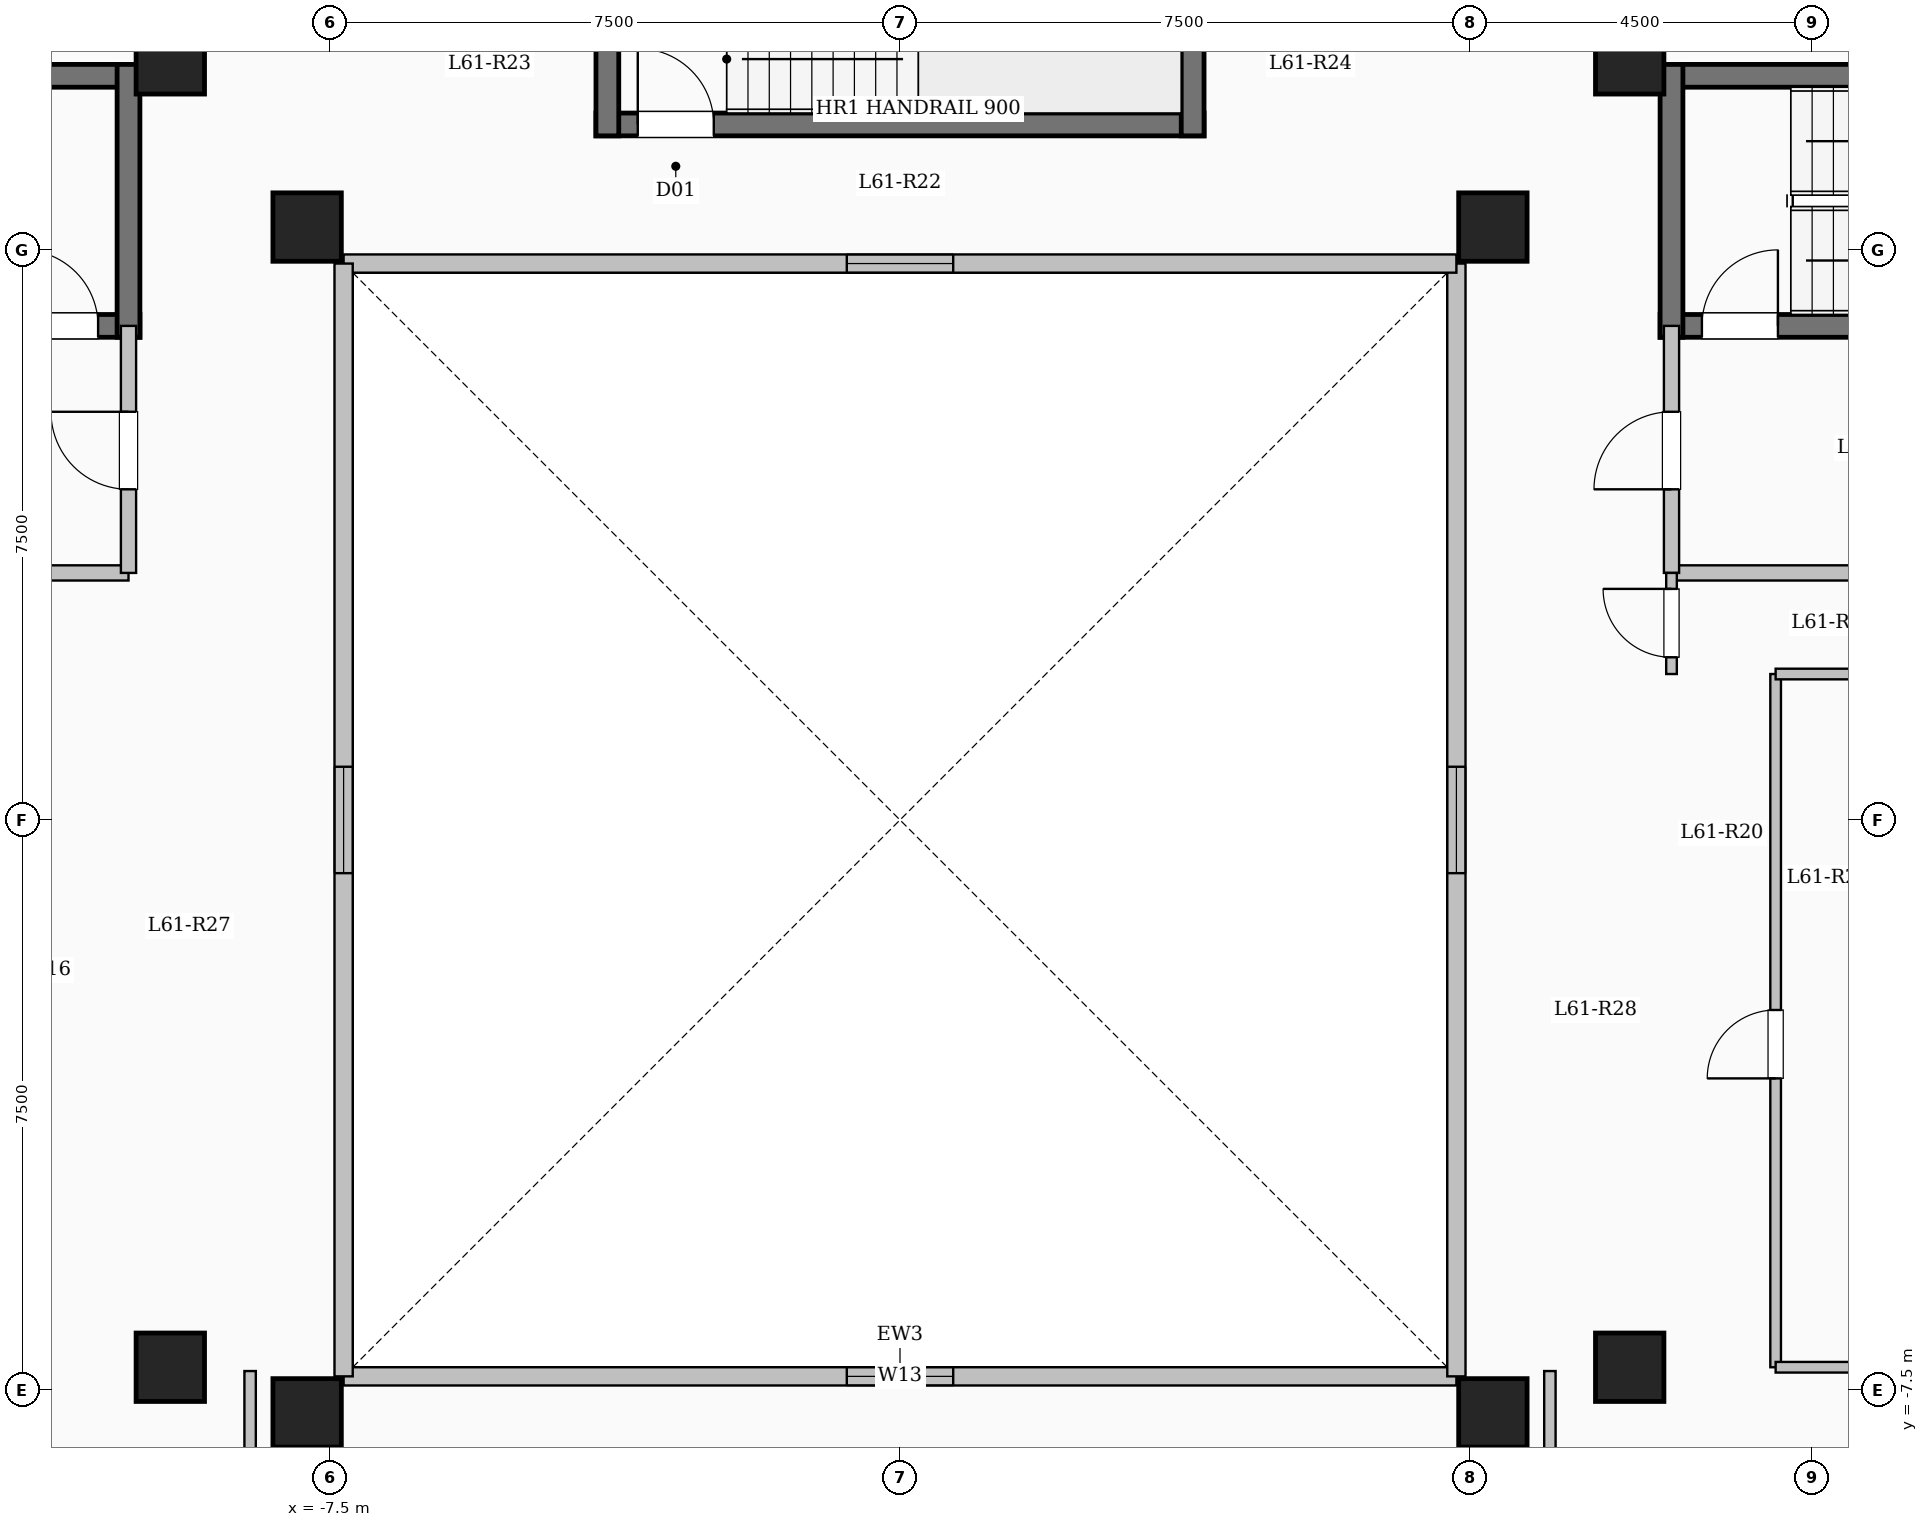
"""IFC4 building model, lengths in metres.
Left out: names, types, materials, properties, quantities, classifications, styles, units other than length and angle.
Written with IfcOpenShell. Run it as: python <this file> out.ifc"""

import sys

from ifc_helpers import new_model, si_unit, direction, frame, frame_2d, origin, origin_2d, place, context, subcontext, project, spatial, rectangle, extrude, element, fill, save


model = new_model("IFC4")
c1 = context("Model", 3, precision=1e-05, world=origin(), true_north=direction((0.0, 1.0)))
c2 = subcontext(c1, "Body", "Model", "MODEL_VIEW")
j1 = project(units=[si_unit("LENGTHUNIT", "METRE"), si_unit("PLANEANGLEUNIT", "RADIAN")], contexts=[c1])
p1 = place(None, origin())
s1 = spatial("IfcSite", under=j1, at=p1, CompositionType="ELEMENT")
p2 = place(p1, origin())
s2 = spatial("IfcBuilding", under=s1, at=p2, CompositionType="ELEMENT")
p3 = place(p2, frame((0.0, 0.0, 223.75)))
s3 = spatial("IfcBuildingStorey", under=s2, at=p3, CompositionType="ELEMENT", Elevation=223.75)
for number, where, z_axis, x_axis in (
    (1, (-7.8, -7.8, 0.0), (0.0, 0.0, 1.0), (1.0, 0.0, 0.0)),
    (2, (7.8, -7.8, 0.0), (0.0, 0.0, 1.0), (1.0, 0.0, 0.0)),
    (3, (-7.8, 7.8, 0.0), (0.0, 0.0, 1.0), (1.0, 0.0, 0.0)),
    (4, (7.8, 7.8, 0.0), (0.0, 0.0, 1.0), (1.0, 0.0, 0.0)),
    (5, (-9.6, -7.2, 0.0), (0.0, 0.0, 1.0), (1.0, 0.0, 0.0)),
    (6, (-9.6, 10.0, 0.0), (0.0, 0.0, 1.0), (1.0, 0.0, 0.0)),
    (7, (9.6, -7.2, 0.0), (0.0, 0.0, 1.0), (1.0, 0.0, 0.0)),
    (8, (9.6, 10.0, 0.0), (0.0, 0.0, 1.0), (1.0, 0.0, 0.0)),
):
    element("IfcColumn", number, at=place(p3, frame(where, z_axis=z_axis, x_axis=x_axis)), inside=s3, PredefinedType="COLUMN", context=c2, shape_type="SweptSolid", body=[
        extrude(rectangle(XDim=0.9, YDim=0.9, at=origin_2d()), origin(), (0.0, 0.0, 1.0), 3.35),
    ])
p4 = place(p3, frame((-7.32, -7.32, 0.0), z_axis=(0.0, 0.0, 1.0), x_axis=(1.0, 0.0, 0.0)))
e9 = element("IfcWall", 9, at=p4, inside=s3, PredefinedType="SOLIDWALL", context=c2, shape_type="SweptSolid", body=[
    extrude(rectangle(XDim=14.64, YDim=0.24, at=frame_2d((7.32, 0.0))), origin(), (0.0, 0.0, 1.0), 3.05),
])
p5 = place(p4, frame((6.62, 0.0, 0.95)))
e10 = element("IfcOpeningElement", 10, at=p5, cuts=e9, PredefinedType="OPENING", context=c2, shape_type="SweptSolid", body=[
    extrude(rectangle(XDim=1.4, YDim=1.5, at=frame_2d((0.7, 0.75))), frame((0.0, 0.13, 0.0), z_axis=(0.0, -1.0, 0.0), x_axis=(1.0, 0.0, 0.0)), (0.0, 0.0, 1.0), 0.26),
])
p6 = place(p3, frame((7.32, -7.32, 0.0), z_axis=(0.0, 0.0, 1.0), x_axis=(0.0, 1.0, 0.0)))
e11 = element("IfcWall", 11, at=p6, inside=s3, PredefinedType="SOLIDWALL", context=c2, shape_type="SweptSolid", body=[
    extrude(rectangle(XDim=14.64, YDim=0.24, at=frame_2d((7.32, 0.0))), origin(), (0.0, 0.0, 1.0), 3.05),
])
p7 = place(p6, frame((6.62, 0.0, 0.95)))
e12 = element("IfcOpeningElement", 12, at=p7, cuts=e11, PredefinedType="OPENING", context=c2, shape_type="SweptSolid", body=[
    extrude(rectangle(XDim=1.4, YDim=1.5, at=frame_2d((0.7, 0.75))), frame((0.0, 0.13, 0.0), z_axis=(0.0, -1.0, 0.0), x_axis=(1.0, 0.0, 0.0)), (0.0, 0.0, 1.0), 0.26),
])
p8 = place(p3, frame((7.32, 7.32, 0.0), z_axis=(0.0, 0.0, 1.0), x_axis=(-1.0, 0.0, 0.0)))
e13 = element("IfcWall", 13, at=p8, inside=s3, PredefinedType="SOLIDWALL", context=c2, shape_type="SweptSolid", body=[
    extrude(rectangle(XDim=14.64, YDim=0.24, at=frame_2d((7.32, 0.0))), origin(), (0.0, 0.0, 1.0), 3.05),
])
p9 = place(p8, frame((6.62, 0.0, 0.95)))
e14 = element("IfcOpeningElement", 14, at=p9, cuts=e13, PredefinedType="OPENING", context=c2, shape_type="SweptSolid", body=[
    extrude(rectangle(XDim=1.4, YDim=1.5, at=frame_2d((0.7, 0.75))), frame((0.0, 0.13, 0.0), z_axis=(0.0, -1.0, 0.0), x_axis=(1.0, 0.0, 0.0)), (0.0, 0.0, 1.0), 0.26),
])
p10 = place(p3, frame((-7.32, 7.32, 0.0), z_axis=(0.0, 0.0, 1.0), x_axis=(0.0, -1.0, 0.0)))
e15 = element("IfcWall", 15, at=p10, inside=s3, PredefinedType="SOLIDWALL", context=c2, shape_type="SweptSolid", body=[
    extrude(rectangle(XDim=14.64, YDim=0.24, at=frame_2d((7.32, 0.0))), origin(), (0.0, 0.0, 1.0), 3.05),
])
p11 = place(p10, frame((6.62, 0.0, 0.95)))
e16 = element("IfcOpeningElement", 16, at=p11, cuts=e15, PredefinedType="OPENING", context=c2, shape_type="SweptSolid", body=[
    extrude(rectangle(XDim=1.4, YDim=1.5, at=frame_2d((0.7, 0.75))), frame((0.0, 0.13, 0.0), z_axis=(0.0, -1.0, 0.0), x_axis=(1.0, 0.0, 0.0)), (0.0, 0.0, 1.0), 0.26),
])
p12 = place(p3, frame((-18.0, 9.79, 0.0), z_axis=(0.0, 0.0, 1.0), x_axis=(1.0, 0.0, 0.0)))
e17 = element("IfcWall", 17, at=p12, inside=s3, PredefinedType="SHEAR", context=c2, shape_type="SweptSolid", body=[
    extrude(rectangle(XDim=8.0, YDim=0.3, at=frame_2d((4.0, 0.0))), origin(), (0.0, 0.0, 1.0), 3.35),
])
p13 = place(p3, frame((-18.0, 6.5, 0.0), z_axis=(0.0, 0.0, 1.0), x_axis=(1.0, 0.0, 0.0)))
e18 = element("IfcWall", 18, at=p13, inside=s3, PredefinedType="SHEAR", context=c2, shape_type="SweptSolid", body=[
    extrude(rectangle(XDim=8.0, YDim=0.3, at=frame_2d((4.0, 0.0))), origin(), (0.0, 0.0, 1.0), 3.35),
])
p14 = place(p13, frame((6.45, 0.0, 0.0)))
e19 = element("IfcOpeningElement", 19, at=p14, cuts=e18, PredefinedType="OPENING", context=c2, shape_type="SweptSolid", body=[
    extrude(rectangle(XDim=1.0, YDim=2.15, at=frame_2d((0.5, 1.075))), frame((0.0, 0.16, 0.0), z_axis=(0.0, -1.0, 0.0), x_axis=(1.0, 0.0, 0.0)), (0.0, 0.0, 1.0), 0.32),
])
p15 = place(p3, frame((-10.15, 6.35, 0.0), z_axis=(0.0, 0.0, 1.0), x_axis=(0.0, 1.0, 0.0)))
e20 = element("IfcWall", 20, at=p15, inside=s3, PredefinedType="SHEAR", context=c2, shape_type="SweptSolid", body=[
    extrude(rectangle(XDim=3.59, YDim=0.3, at=frame_2d((1.795, 0.0))), origin(), (0.0, 0.0, 1.0), 3.35),
])
p16 = place(p3, frame((10.0, 9.79, 0.0), z_axis=(0.0, 0.0, 1.0), x_axis=(1.0, 0.0, 0.0)))
e21 = element("IfcWall", 21, at=p16, inside=s3, PredefinedType="SHEAR", context=c2, shape_type="SweptSolid", body=[
    extrude(rectangle(XDim=8.0, YDim=0.3, at=frame_2d((4.0, 0.0))), origin(), (0.0, 0.0, 1.0), 3.35),
])
p17 = place(p3, frame((10.0, 6.5, 0.0), z_axis=(0.0, 0.0, 1.0), x_axis=(1.0, 0.0, 0.0)))
e22 = element("IfcWall", 22, at=p17, inside=s3, PredefinedType="SHEAR", context=c2, shape_type="SweptSolid", body=[
    extrude(rectangle(XDim=8.0, YDim=0.3, at=frame_2d((4.0, 0.0))), origin(), (0.0, 0.0, 1.0), 3.35),
])
p18 = place(p17, frame((0.55, 0.0, 0.0)))
e23 = element("IfcOpeningElement", 23, at=p18, cuts=e22, PredefinedType="OPENING", context=c2, shape_type="SweptSolid", body=[
    extrude(rectangle(XDim=1.0, YDim=2.15, at=frame_2d((0.5, 1.075))), frame((0.0, 0.16, 0.0), z_axis=(0.0, -1.0, 0.0), x_axis=(1.0, 0.0, 0.0)), (0.0, 0.0, 1.0), 0.32),
])
p19 = place(p3, frame((10.15, 6.35, 0.0), z_axis=(0.0, 0.0, 1.0), x_axis=(0.0, 1.0, 0.0)))
e24 = element("IfcWall", 24, at=p19, inside=s3, PredefinedType="SHEAR", context=c2, shape_type="SweptSolid", body=[
    extrude(rectangle(XDim=3.59, YDim=0.3, at=frame_2d((1.795, 0.0))), origin(), (0.0, 0.0, 1.0), 3.35),
])
p20 = place(p3, frame((-4.0, 9.15, 0.0), z_axis=(0.0, 0.0, 1.0), x_axis=(1.0, 0.0, 0.0)))
e25 = element("IfcWall", 25, at=p20, inside=s3, PredefinedType="SHEAR", context=c2, shape_type="SweptSolid", body=[
    extrude(rectangle(XDim=8.0, YDim=0.3, at=frame_2d((4.0, 0.0))), origin(), (0.0, 0.0, 1.0), 3.35),
])
p21 = place(p20, frame((0.55, 0.0, 0.0)))
e26 = element("IfcOpeningElement", 26, at=p21, cuts=e25, PredefinedType="OPENING", context=c2, shape_type="SweptSolid", body=[
    extrude(rectangle(XDim=1.0, YDim=2.15, at=frame_2d((0.5, 1.075))), frame((0.0, 0.16, 0.0), z_axis=(0.0, -1.0, 0.0), x_axis=(1.0, 0.0, 0.0)), (0.0, 0.0, 1.0), 0.32),
])
for number, where, z_axis, x_axis in (
    (27, (-3.85, 9.0, 0.0), (0.0, 0.0, 1.0), (0.0, 1.0, 0.0)),
    (28, (3.85, 9.0, 0.0), (0.0, 0.0, 1.0), (0.0, 1.0, 0.0)),
):
    element("IfcWall", number, at=place(p3, frame(where, z_axis=z_axis, x_axis=x_axis)), inside=s3, PredefinedType="SHEAR", context=c2, shape_type="SweptSolid", body=[
        extrude(rectangle(XDim=3.59, YDim=0.3, at=frame_2d((1.795, 0.0))), origin(), (0.0, 0.0, 1.0), 3.35),
    ])
p22 = place(p3, frame((-15.55, 3.25, 0.0), z_axis=(0.0, 0.0, 1.0), x_axis=(1.0, 0.0, 0.0)))
e29 = element("IfcWall", 29, at=p22, inside=s3, PredefinedType="SOLIDWALL", context=c2, shape_type="SweptSolid", body=[
    extrude(rectangle(XDim=5.4, YDim=0.2, at=frame_2d((2.7, 0.0))), origin(), (0.0, 0.0, 1.0), 3.05),
])
p23 = place(p3, frame((-10.15, 3.25, 0.0), z_axis=(0.0, 0.0, 1.0), x_axis=(0.0, 1.0, 0.0)))
e30 = element("IfcWall", 30, at=p23, inside=s3, PredefinedType="SOLIDWALL", context=c2, shape_type="SweptSolid", body=[
    extrude(rectangle(XDim=3.25, YDim=0.2, at=frame_2d((1.625, 0.0))), origin(), (0.0, 0.0, 1.0), 3.05),
])
p24 = place(p23, frame((1.1, 0.0, 0.0)))
e31 = element("IfcOpeningElement", 31, at=p24, cuts=e30, PredefinedType="OPENING", context=c2, shape_type="SweptSolid", body=[
    extrude(rectangle(XDim=1.02, YDim=2.15, at=frame_2d((0.51, 1.075))), frame((0.0, 0.11, 0.0), z_axis=(0.0, -1.0, 0.0), x_axis=(1.0, 0.0, 0.0)), (0.0, 0.0, 1.0), 0.22),
])
p25 = place(p3, frame((10.15, 3.25, 0.0), z_axis=(0.0, 0.0, 1.0), x_axis=(1.0, 0.0, 0.0)))
e32 = element("IfcWall", 32, at=p25, inside=s3, PredefinedType="SOLIDWALL", context=c2, shape_type="SweptSolid", body=[
    extrude(rectangle(XDim=5.4, YDim=0.2, at=frame_2d((2.7, 0.0))), origin(), (0.0, 0.0, 1.0), 3.05),
])
p26 = place(p3, frame((10.15, 3.25, 0.0), z_axis=(0.0, 0.0, 1.0), x_axis=(0.0, 1.0, 0.0)))
e33 = element("IfcWall", 33, at=p26, inside=s3, PredefinedType="SOLIDWALL", context=c2, shape_type="SweptSolid", body=[
    extrude(rectangle(XDim=3.25, YDim=0.2, at=frame_2d((1.625, 0.0))), origin(), (0.0, 0.0, 1.0), 3.05),
])
p27 = place(p26, frame((1.1, 0.0, 0.0)))
e34 = element("IfcOpeningElement", 34, at=p27, cuts=e33, PredefinedType="OPENING", context=c2, shape_type="SweptSolid", body=[
    extrude(rectangle(XDim=1.02, YDim=2.15, at=frame_2d((0.51, 1.075))), frame((0.0, 0.11, 0.0), z_axis=(0.0, -1.0, 0.0), x_axis=(1.0, 0.0, 0.0)), (0.0, 0.0, 1.0), 0.22),
])
p28 = place(p3, frame((10.15, 1.92, 0.0), z_axis=(0.0, 0.0, 1.0), x_axis=(0.0, 1.0, 0.0)))
e35 = element("IfcWall", 35, at=p28, inside=s3, PredefinedType="PARTITIONING", context=c2, shape_type="SweptSolid", body=[
    extrude(rectangle(XDim=1.33, YDim=0.14, at=frame_2d((0.665, 0.0))), origin(), (0.0, 0.0, 1.0), 3.05),
])
p29 = place(p28, frame((0.22, 0.0, 0.0)))
e36 = element("IfcOpeningElement", 36, at=p29, cuts=e35, PredefinedType="OPENING", context=c2, shape_type="SweptSolid", body=[
    extrude(rectangle(XDim=0.9, YDim=2.08, at=frame_2d((0.45, 1.04))), frame((0.0, 0.08, 0.0), z_axis=(0.0, -1.0, 0.0), x_axis=(1.0, 0.0, 0.0)), (0.0, 0.0, 1.0), 0.16),
])
p30 = place(p3, frame((11.52, -7.2, 0.0), z_axis=(0.0, 0.0, 1.0), x_axis=(0.0, 1.0, 0.0)))
e37 = element("IfcWall", 37, at=p30, inside=s3, PredefinedType="PARTITIONING", context=c2, shape_type="SweptSolid", body=[
    extrude(rectangle(XDim=9.12, YDim=0.14, at=frame_2d((4.56, 0.0))), origin(), (0.0, 0.0, 1.0), 3.05),
])
p31 = place(p30, frame((3.8, 0.0, 0.0)))
e38 = element("IfcOpeningElement", 38, at=p31, cuts=e37, PredefinedType="OPENING", context=c2, shape_type="SweptSolid", body=[
    extrude(rectangle(XDim=0.9, YDim=2.08, at=frame_2d((0.45, 1.04))), frame((0.0, 0.08, 0.0), z_axis=(0.0, -1.0, 0.0), x_axis=(1.0, 0.0, 0.0)), (0.0, 0.0, 1.0), 0.16),
])
p32 = place(p3, frame((11.52, 1.92, 0.0), z_axis=(0.0, 0.0, 1.0), x_axis=(1.0, 0.0, 0.0)))
e39 = element("IfcWall", 39, at=p32, inside=s3, PredefinedType="PARTITIONING", context=c2, shape_type="SweptSolid", body=[
    extrude(rectangle(XDim=1.33, YDim=0.14, at=frame_2d((0.665, 0.0))), origin(), (0.0, 0.0, 1.0), 3.05),
])
p33 = place(p3, frame((11.52, -7.2, 0.0), z_axis=(0.0, 0.0, 1.0), x_axis=(1.0, 0.0, 0.0)))
e40 = element("IfcWall", 40, at=p33, inside=s3, PredefinedType="PARTITIONING", context=c2, shape_type="SweptSolid", body=[
    extrude(rectangle(XDim=1.33, YDim=0.14, at=frame_2d((0.665, 0.0))), origin(), (0.0, 0.0, 1.0), 2.22),
])
for number, where, z_axis, x_axis in (
    (41, (-8.55, -9.4, 0.0), (0.0, 0.0, 1.0), (0.0, 1.0, 0.0)),
    (42, (8.55, -9.4, 0.0), (0.0, 0.0, 1.0), (0.0, 1.0, 0.0)),
):
    element("IfcWall", number, at=place(p3, frame(where, z_axis=z_axis, x_axis=x_axis)), inside=s3, PredefinedType="PARTITIONING", context=c2, shape_type="SweptSolid", body=[
        extrude(rectangle(XDim=2.15, YDim=0.15, at=frame_2d((1.075, 0.0))), origin(), (0.0, 0.0, 1.0), 3.05),
    ])
p34 = place(p5, origin())
e43 = element("IfcWindow", 43, at=p34, inside=s3, PartitioningType="SINGLE_PANEL", PredefinedType="WINDOW", context=c2, shape_type="SweptSolid", body=[
    extrude(rectangle(XDim=1.4, YDim=1.5, at=frame_2d((0.7, 0.75))), frame((0.0, 0.03, 0.0), z_axis=(0.0, -1.0, 0.0), x_axis=(1.0, 0.0, 0.0)), (0.0, 0.0, 1.0), 0.06),
])
fill(e10, e43)
p35 = place(p7, origin())
e44 = element("IfcWindow", 44, at=p35, inside=s3, PartitioningType="SINGLE_PANEL", PredefinedType="WINDOW", context=c2, shape_type="SweptSolid", body=[
    extrude(rectangle(XDim=1.4, YDim=1.5, at=frame_2d((0.7, 0.75))), frame((0.0, 0.03, 0.0), z_axis=(0.0, -1.0, 0.0), x_axis=(1.0, 0.0, 0.0)), (0.0, 0.0, 1.0), 0.06),
])
fill(e12, e44)
p36 = place(p9, origin())
e45 = element("IfcWindow", 45, at=p36, inside=s3, PartitioningType="SINGLE_PANEL", PredefinedType="WINDOW", context=c2, shape_type="SweptSolid", body=[
    extrude(rectangle(XDim=1.4, YDim=1.5, at=frame_2d((0.7, 0.75))), frame((0.0, 0.03, 0.0), z_axis=(0.0, -1.0, 0.0), x_axis=(1.0, 0.0, 0.0)), (0.0, 0.0, 1.0), 0.06),
])
fill(e14, e45)
p37 = place(p11, origin())
e46 = element("IfcWindow", 46, at=p37, inside=s3, PartitioningType="SINGLE_PANEL", PredefinedType="WINDOW", context=c2, shape_type="SweptSolid", body=[
    extrude(rectangle(XDim=1.4, YDim=1.5, at=frame_2d((0.7, 0.75))), frame((0.0, 0.03, 0.0), z_axis=(0.0, -1.0, 0.0), x_axis=(1.0, 0.0, 0.0)), (0.0, 0.0, 1.0), 0.06),
])
fill(e16, e46)
p38 = place(p14, origin())
e47 = element("IfcDoor", 47, at=p38, inside=s3, OperationType="SINGLE_SWING_LEFT", PredefinedType="DOOR", context=c2, shape_type="SweptSolid", body=[
    extrude(rectangle(XDim=1.0, YDim=2.15, at=frame_2d((0.5, 1.075))), frame((0.0, 0.025, 0.0), z_axis=(0.0, -1.0, 0.0), x_axis=(1.0, 0.0, 0.0)), (0.0, 0.0, 1.0), 0.05),
])
fill(e19, e47)
p39 = place(p18, origin())
e48 = element("IfcDoor", 48, at=p39, inside=s3, OperationType="SINGLE_SWING_RIGHT", PredefinedType="DOOR", context=c2, shape_type="SweptSolid", body=[
    extrude(rectangle(XDim=1.0, YDim=2.15, at=frame_2d((0.5, 1.075))), frame((0.0, 0.025, 0.0), z_axis=(0.0, -1.0, 0.0), x_axis=(1.0, 0.0, 0.0)), (0.0, 0.0, 1.0), 0.05),
])
fill(e23, e48)
p40 = place(p21, origin())
e49 = element("IfcDoor", 49, at=p40, inside=s3, OperationType="SINGLE_SWING_LEFT", PredefinedType="DOOR", context=c2, shape_type="SweptSolid", body=[
    extrude(rectangle(XDim=1.0, YDim=2.15, at=frame_2d((0.5, 1.075))), frame((0.0, 0.025, 0.0), z_axis=(0.0, -1.0, 0.0), x_axis=(1.0, 0.0, 0.0)), (0.0, 0.0, 1.0), 0.05),
])
fill(e26, e49)
p41 = place(p24, origin())
e50 = element("IfcDoor", 50, at=p41, inside=s3, OperationType="SINGLE_SWING_RIGHT", PredefinedType="DOOR", context=c2, shape_type="SweptSolid", body=[
    extrude(rectangle(XDim=1.02, YDim=2.15, at=frame_2d((0.51, 1.075))), frame((0.0, 0.025, 0.0), z_axis=(0.0, -1.0, 0.0), x_axis=(1.0, 0.0, 0.0)), (0.0, 0.0, 1.0), 0.05),
])
fill(e31, e50)
p42 = place(p27, origin())
e51 = element("IfcDoor", 51, at=p42, inside=s3, OperationType="SINGLE_SWING_LEFT", PredefinedType="DOOR", context=c2, shape_type="SweptSolid", body=[
    extrude(rectangle(XDim=1.02, YDim=2.15, at=frame_2d((0.51, 1.075))), frame((0.0, 0.025, 0.0), z_axis=(0.0, -1.0, 0.0), x_axis=(1.0, 0.0, 0.0)), (0.0, 0.0, 1.0), 0.05),
])
fill(e34, e51)
p43 = place(p29, origin())
e52 = element("IfcDoor", 52, at=p43, inside=s3, OperationType="SINGLE_SWING_RIGHT", PredefinedType="DOOR", context=c2, shape_type="SweptSolid", body=[
    extrude(rectangle(XDim=0.9, YDim=2.08, at=frame_2d((0.45, 1.04))), frame((0.0, 0.025, 0.0), z_axis=(0.0, -1.0, 0.0), x_axis=(1.0, 0.0, 0.0)), (0.0, 0.0, 1.0), 0.05),
])
fill(e36, e52)
p44 = place(p31, origin())
e53 = element("IfcDoor", 53, at=p44, inside=s3, OperationType="SINGLE_SWING_LEFT", PredefinedType="DOOR", context=c2, shape_type="SweptSolid", body=[
    extrude(rectangle(XDim=0.9, YDim=2.08, at=frame_2d((0.45, 1.04))), frame((0.0, 0.025, 0.0), z_axis=(0.0, -1.0, 0.0), x_axis=(1.0, 0.0, 0.0)), (0.0, 0.0, 1.0), 0.05),
])
fill(e38, e53)
save(model, sys.argv[1])
